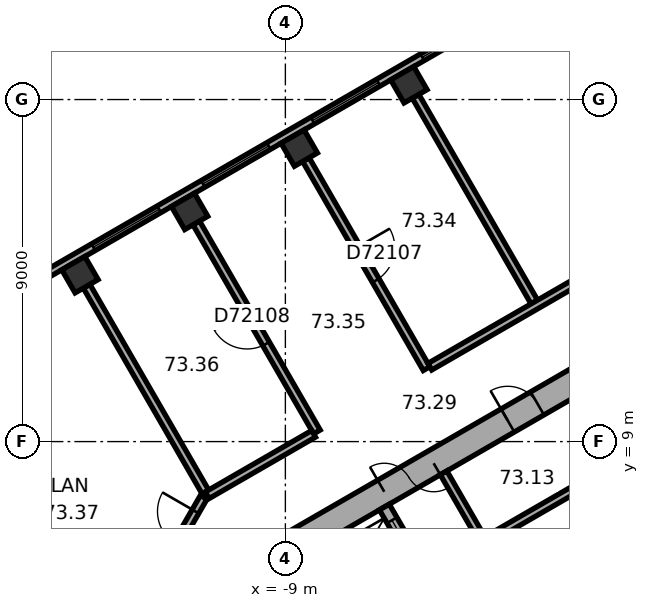
"""IFC4 building model, lengths in metres.
Left out: names, types, materials, properties, quantities, classifications, styles, units other than length and angle.
Written with IfcOpenShell. Run it as: python <this file> out.ifc"""

import sys

from ifc_helpers import new_model, si_unit, direction, frame, frame_2d, origin, origin_2d, place, context, subcontext, project, spatial, rectangle, extrude, element, fill, save


model = new_model("IFC4")
c1 = context("Model", 3, precision=1e-05, world=origin(), true_north=direction((0.0, 1.0)))
c2 = subcontext(c1, "Body", "Model", "MODEL_VIEW")
j1 = project(units=[si_unit("LENGTHUNIT", "METRE"), si_unit("PLANEANGLEUNIT", "RADIAN")], contexts=[c1])
p1 = place(None, origin())
s1 = spatial("IfcSite", under=j1, at=p1, CompositionType="ELEMENT")
p2 = place(p1, origin())
s2 = spatial("IfcBuilding", under=s1, at=p2, CompositionType="ELEMENT")
p3 = place(p2, frame((0.0, 0.0, 296.8)))
s3 = spatial("IfcBuildingStorey", under=s2, at=p3, CompositionType="ELEMENT", Elevation=296.8)
for number, where, z_axis, x_axis in (
    (1, (-5.75, 18.389, 0.0), (0.0, 0.0, 1.0), (-0.866, -0.5, 0.0)),
    (2, (-8.635, 16.723, 0.0), (0.0, 0.0, 1.0), (-0.866, -0.5, 0.0)),
    (3, (-11.52, 15.057, 0.0), (0.0, 0.0, 1.0), (-0.866, -0.5, 0.0)),
    (4, (-14.406, 13.391, 0.0), (0.0, 0.0, 1.0), (-0.866, -0.5, 0.0)),
):
    element("IfcColumn", number, at=place(p3, frame(where, z_axis=z_axis, x_axis=x_axis)), inside=s3, PredefinedType="COLUMN", context=c2, shape_type="SweptSolid", body=[
        extrude(rectangle(XDim=0.7, YDim=0.7, at=origin_2d()), origin(), (0.0, 0.0, 1.0), 3.7),
    ])
p4 = place(p3, frame((0.175, 11.475, 0.0), z_axis=(0.0, 0.0, 1.0), x_axis=(-0.866026453023, -0.499998182661, 0.0)))
e5 = element("IfcWall", 5, at=p4, inside=s3, PredefinedType="SHEAR", context=c2, shape_type="SweptSolid", body=[
    extrude(rectangle(XDim=11.778, YDim=0.7, at=frame_2d((5.889, 0.0))), origin(), (0.0, 0.0, 1.0), 3.7),
])
p5 = place(p4, frame((6.089, 0.0, 0.0)))
e6 = element("IfcOpeningElement", 6, at=p5, cuts=e5, PredefinedType="OPENING", context=c2, shape_type="SweptSolid", body=[
    extrude(rectangle(XDim=1.5, YDim=2.1, at=frame_2d((0.75, 1.05))), frame((0.0, 0.36, 0.0), z_axis=(0.0, -1.0, 0.0), x_axis=(1.0, 0.0, 0.0)), (0.0, 0.0, 1.0), 0.72),
])
p6 = place(p4, frame((2.939, 0.0, 0.0)))
e7 = element("IfcOpeningElement", 7, at=p6, cuts=e5, PredefinedType="OPENING", context=c2, shape_type="SweptSolid", body=[
    extrude(rectangle(XDim=0.9, YDim=2.1, at=frame_2d((0.45, 1.05))), frame((0.0, 0.36, 0.0), z_axis=(0.0, -1.0, 0.0), x_axis=(1.0, 0.0, 0.0)), (0.0, 0.0, 1.0), 0.72),
])
p7 = place(p3, frame((-2.624, 20.713, 0.0), z_axis=(0.0, 0.0, 1.0), x_axis=(-0.866026460444, -0.499998169808, 0.0)))
e8 = element("IfcWall", 8, at=p7, inside=s3, PredefinedType="STANDARD", context=c2, shape_type="SweptSolid", body=[
    extrude(rectangle(XDim=17.731, YDim=0.2, at=frame_2d((8.866, 0.0))), origin(), (0.0, 0.0, 1.0), 3.7),
])
p8 = place(p7, frame((1.203, 0.0, 0.9)))
e9 = element("IfcOpeningElement", 9, at=p8, cuts=e8, PredefinedType="OPENING", context=c2, shape_type="SweptSolid", body=[
    extrude(rectangle(XDim=2.0, YDim=2.0, at=frame_2d((1.0, 1.0))), frame((0.0, 0.11, 0.0), z_axis=(0.0, -1.0, 0.0), x_axis=(1.0, 0.0, 0.0)), (0.0, 0.0, 1.0), 0.22),
])
p9 = place(p7, frame((4.535, 0.0, 0.9)))
e10 = element("IfcOpeningElement", 10, at=p9, cuts=e8, PredefinedType="OPENING", context=c2, shape_type="SweptSolid", body=[
    extrude(rectangle(XDim=2.0, YDim=2.0, at=frame_2d((1.0, 1.0))), frame((0.0, 0.11, 0.0), z_axis=(0.0, -1.0, 0.0), x_axis=(1.0, 0.0, 0.0)), (0.0, 0.0, 1.0), 0.22),
])
p10 = place(p7, frame((7.867, 0.0, 0.9)))
e11 = element("IfcOpeningElement", 11, at=p10, cuts=e8, PredefinedType="OPENING", context=c2, shape_type="SweptSolid", body=[
    extrude(rectangle(XDim=2.0, YDim=2.0, at=frame_2d((1.0, 1.0))), frame((0.0, 0.11, 0.0), z_axis=(0.0, -1.0, 0.0), x_axis=(1.0, 0.0, 0.0)), (0.0, 0.0, 1.0), 0.22),
])
p11 = place(p7, frame((11.198, 0.0, 0.9)))
e12 = element("IfcOpeningElement", 12, at=p11, cuts=e8, PredefinedType="OPENING", context=c2, shape_type="SweptSolid", body=[
    extrude(rectangle(XDim=2.0, YDim=2.0, at=frame_2d((1.0, 1.0))), frame((0.0, 0.11, 0.0), z_axis=(0.0, -1.0, 0.0), x_axis=(1.0, 0.0, 0.0)), (0.0, 0.0, 1.0), 0.22),
])
p12 = place(p7, frame((14.53, 0.0, 0.9)))
e13 = element("IfcOpeningElement", 13, at=p12, cuts=e8, PredefinedType="OPENING", context=c2, shape_type="SweptSolid", body=[
    extrude(rectangle(XDim=2.0, YDim=2.0, at=frame_2d((1.0, 1.0))), frame((0.0, 0.11, 0.0), z_axis=(0.0, -1.0, 0.0), x_axis=(1.0, 0.0, 0.0)), (0.0, 0.0, 1.0), 0.22),
])
p13 = place(p3, frame((0.803, 9.009, 0.0), z_axis=(0.0, 0.0, 1.0), x_axis=(-0.866028230842, -0.499995103361, 0.0)))
e14 = element("IfcWall", 14, at=p13, inside=s3, PredefinedType="PARTITIONING", context=c2, shape_type="SweptSolid", body=[
    extrude(rectangle(XDim=5.4, YDim=0.2, at=frame_2d((2.7, 0.0))), origin(), (0.0, 0.0, 1.0), 3.35),
])
p14 = place(p3, frame((-3.737, 6.272, 0.0), z_axis=(0.0, 0.0, 1.0), x_axis=(-0.50002983664, 0.866008176907, 0.0)))
e15 = element("IfcWall", 15, at=p14, inside=s3, PredefinedType="PARTITIONING", context=c2, shape_type="SweptSolid", body=[
    extrude(rectangle(XDim=2.2, YDim=0.2, at=frame_2d((1.1, 0.0))), origin(), (0.0, 0.0, 1.0), 3.35),
])
p15 = place(p3, frame((-2.216, 4.282, 0.0), z_axis=(0.0, 0.0, 1.0), x_axis=(0.499977259774, 0.866038532462, 0.0)))
e16 = element("IfcWall", 16, at=p15, inside=s3, PredefinedType="SHEAR", context=c2, shape_type="SweptSolid", body=[
    extrude(rectangle(XDim=4.7, YDim=0.3, at=frame_2d((2.35, 0.0))), origin(), (0.0, 0.0, 1.0), 3.35),
])
p16 = place(p3, frame((-5.295, 5.372, 0.0), z_axis=(0.0, 0.0, 1.0), x_axis=(-0.500077893725, 0.86598042715, 0.0)))
e17 = element("IfcWall", 17, at=p16, inside=s3, PredefinedType="SHEAR", context=c2, shape_type="SweptSolid", body=[
    extrude(rectangle(XDim=2.2, YDim=0.3, at=frame_2d((1.1, 0.0))), origin(), (0.0, 0.0, 1.0), 3.35),
])
p17 = place(p16, frame((0.7, 0.0, 0.0)))
e18 = element("IfcOpeningElement", 18, at=p17, cuts=e17, PredefinedType="OPENING", context=c2, shape_type="SweptSolid", body=[
    extrude(rectangle(XDim=1.1, YDim=2.1, at=frame_2d((0.55, 1.05))), frame((0.0, 0.16, 0.0), z_axis=(0.0, -1.0, 0.0), x_axis=(1.0, 0.0, 0.0)), (0.0, 0.0, 1.0), 0.32),
])
p18 = place(p3, frame((-14.23, 13.088, 0.0), z_axis=(0.0, 0.0, 1.0), x_axis=(0.500004234368, -0.866022959057, 0.0)))
e19 = element("IfcWall", 19, at=p18, inside=s3, PredefinedType="PARTITIONING", context=c2, shape_type="SweptSolid", body=[
    extrude(rectangle(XDim=6.25, YDim=0.2, at=frame_2d((3.125, 0.0))), origin(), (0.0, 0.0, 1.0), 3.35),
])
p19 = place(p3, frame((-11.345, 14.754, 0.0), z_axis=(0.0, 0.0, 1.0), x_axis=(0.500005339912, -0.866022320763, 0.0)))
e20 = element("IfcWall", 20, at=p19, inside=s3, PredefinedType="PARTITIONING", context=c2, shape_type="SweptSolid", body=[
    extrude(rectangle(XDim=6.35, YDim=0.2, at=frame_2d((3.175, 0.0))), origin(), (0.0, 0.0, 1.0), 3.35),
])
p20 = place(p19, frame((2.675, 0.0, 0.0)))
e21 = element("IfcOpeningElement", 21, at=p20, cuts=e20, PredefinedType="OPENING", context=c2, shape_type="SweptSolid", body=[
    extrude(rectangle(XDim=1.0, YDim=2.1, at=frame_2d((0.5, 1.05))), frame((0.0, 0.11, 0.0), z_axis=(0.0, -1.0, 0.0), x_axis=(1.0, 0.0, 0.0)), (0.0, 0.0, 1.0), 0.22),
])
p21 = place(p3, frame((-11.15, 7.534, 0.0), z_axis=(0.0, 0.0, 1.0), x_axis=(-0.500063286585, -0.865988862174, 0.0)))
e22 = element("IfcWall", 22, at=p21, inside=s3, PredefinedType="PARTITIONING", context=c2, shape_type="SweptSolid", body=[
    extrude(rectangle(XDim=1.86, YDim=0.2, at=frame_2d((0.93, 0.0))), origin(), (0.0, 0.0, 1.0), 3.35),
])
p22 = place(p21, frame((0.43, 0.0, 0.0)))
e23 = element("IfcOpeningElement", 23, at=p22, cuts=e22, PredefinedType="OPENING", context=c2, shape_type="SweptSolid", body=[
    extrude(rectangle(XDim=1.0, YDim=2.1, at=frame_2d((0.5, 1.05))), frame((0.0, 0.11, 0.0), z_axis=(0.0, -1.0, 0.0), x_axis=(1.0, 0.0, 0.0)), (0.0, 0.0, 1.0), 0.22),
])
p23 = place(p3, frame((-8.46, 16.42, 0.0), z_axis=(0.0, 0.0, 1.0), x_axis=(0.500005339912, -0.866022320763, 0.0)))
e24 = element("IfcWall", 24, at=p23, inside=s3, PredefinedType="PARTITIONING", context=c2, shape_type="SweptSolid", body=[
    extrude(rectangle(XDim=6.35, YDim=0.2, at=frame_2d((3.175, 0.0))), origin(), (0.0, 0.0, 1.0), 2.65),
])
p24 = place(p23, frame((2.675, 0.0, 0.0)))
e25 = element("IfcOpeningElement", 25, at=p24, cuts=e24, PredefinedType="OPENING", context=c2, shape_type="SweptSolid", body=[
    extrude(rectangle(XDim=1.0, YDim=2.1, at=frame_2d((0.5, 1.05))), frame((0.0, 0.11, 0.0), z_axis=(0.0, -1.0, 0.0), x_axis=(1.0, 0.0, 0.0)), (0.0, 0.0, 1.0), 0.22),
])
p25 = place(p3, frame((-8.257, 9.205, 0.0), z_axis=(0.0, 0.0, 1.0), x_axis=(-0.866030838723, -0.499990586292, 0.0)))
e26 = element("IfcWall", 26, at=p25, inside=s3, PredefinedType="PARTITIONING", context=c2, shape_type="SweptSolid", body=[
    extrude(rectangle(XDim=3.231, YDim=0.2, at=frame_2d((1.616, 0.0))), origin(), (0.0, 0.0, 1.0), 3.35),
])
p26 = place(p3, frame((-5.575, 18.086, 0.0), z_axis=(0.0, 0.0, 1.0), x_axis=(0.500004234368, -0.866022959057, 0.0)))
e27 = element("IfcWall", 27, at=p26, inside=s3, PredefinedType="PARTITIONING", context=c2, shape_type="SweptSolid", body=[
    extrude(rectangle(XDim=6.25, YDim=0.2, at=frame_2d((3.125, 0.0))), origin(), (0.0, 0.0, 1.0), 3.35),
])
p27 = place(p3, frame((-0.95, 13.423, 0.0), z_axis=(0.0, 0.0, 1.0), x_axis=(-0.86603557629, -0.499982380289, 0.0)))
e28 = element("IfcWall", 28, at=p27, inside=s3, PredefinedType="PARTITIONING", context=c2, shape_type="SweptSolid", body=[
    extrude(rectangle(XDim=4.906, YDim=0.2, at=frame_2d((2.453, 0.0))), origin(), (0.0, 0.0, 1.0), 3.35),
])
p28 = place(p8, origin())
e29 = element("IfcWindow", 29, at=p28, inside=s3, PartitioningType="SINGLE_PANEL", PredefinedType="WINDOW", context=c2, shape_type="SweptSolid", body=[
    extrude(rectangle(XDim=2.0, YDim=2.0, at=frame_2d((1.0, 1.0))), frame((0.0, 0.03, 0.0), z_axis=(0.0, -1.0, 0.0), x_axis=(1.0, 0.0, 0.0)), (0.0, 0.0, 1.0), 0.06),
])
fill(e9, e29)
p29 = place(p9, origin())
e30 = element("IfcWindow", 30, at=p29, inside=s3, PartitioningType="SINGLE_PANEL", PredefinedType="WINDOW", context=c2, shape_type="SweptSolid", body=[
    extrude(rectangle(XDim=2.0, YDim=2.0, at=frame_2d((1.0, 1.0))), frame((0.0, 0.03, 0.0), z_axis=(0.0, -1.0, 0.0), x_axis=(1.0, 0.0, 0.0)), (0.0, 0.0, 1.0), 0.06),
])
fill(e10, e30)
p30 = place(p10, origin())
e31 = element("IfcWindow", 31, at=p30, inside=s3, PartitioningType="SINGLE_PANEL", PredefinedType="WINDOW", context=c2, shape_type="SweptSolid", body=[
    extrude(rectangle(XDim=2.0, YDim=2.0, at=frame_2d((1.0, 1.0))), frame((0.0, 0.03, 0.0), z_axis=(0.0, -1.0, 0.0), x_axis=(1.0, 0.0, 0.0)), (0.0, 0.0, 1.0), 0.06),
])
fill(e11, e31)
p31 = place(p11, origin())
e32 = element("IfcWindow", 32, at=p31, inside=s3, PartitioningType="SINGLE_PANEL", PredefinedType="WINDOW", context=c2, shape_type="SweptSolid", body=[
    extrude(rectangle(XDim=2.0, YDim=2.0, at=frame_2d((1.0, 1.0))), frame((0.0, 0.03, 0.0), z_axis=(0.0, -1.0, 0.0), x_axis=(1.0, 0.0, 0.0)), (0.0, 0.0, 1.0), 0.06),
])
fill(e12, e32)
p32 = place(p5, origin())
e33 = element("IfcDoor", 33, at=p32, inside=s3, OperationType="DOUBLE_DOOR_SINGLE_SWING", PredefinedType="DOOR", context=c2, shape_type="SweptSolid", body=[
    extrude(rectangle(XDim=1.5, YDim=2.1, at=frame_2d((0.75, 1.05))), frame((0.0, 0.025, 0.0), z_axis=(0.0, -1.0, 0.0), x_axis=(1.0, 0.0, 0.0)), (0.0, 0.0, 1.0), 0.05),
])
fill(e6, e33)
p33 = place(p6, origin())
e34 = element("IfcDoor", 34, at=p33, inside=s3, OperationType="SINGLE_SWING_LEFT", PredefinedType="DOOR", context=c2, shape_type="SweptSolid", body=[
    extrude(rectangle(XDim=0.9, YDim=2.1, at=frame_2d((0.45, 1.05))), frame((0.0, 0.025, 0.0), z_axis=(0.0, -1.0, 0.0), x_axis=(1.0, 0.0, 0.0)), (0.0, 0.0, 1.0), 0.05),
])
fill(e7, e34)
p34 = place(p17, origin())
e35 = element("IfcDoor", 35, at=p34, inside=s3, OperationType="DOUBLE_DOOR_SLIDING", PredefinedType="DOOR", context=c2, shape_type="SweptSolid", body=[
    extrude(rectangle(XDim=1.1, YDim=2.1, at=frame_2d((0.55, 1.05))), frame((0.0, 0.025, 0.0), z_axis=(0.0, -1.0, 0.0), x_axis=(1.0, 0.0, 0.0)), (0.0, 0.0, 1.0), 0.05),
])
fill(e18, e35)
p35 = place(p24, origin())
e36 = element("IfcDoor", 36, at=p35, inside=s3, OperationType="SINGLE_SWING_LEFT", PredefinedType="DOOR", context=c2, shape_type="SweptSolid", body=[
    extrude(rectangle(XDim=1.0, YDim=2.1, at=frame_2d((0.5, 1.05))), frame((0.0, 0.025, 0.0), z_axis=(0.0, -1.0, 0.0), x_axis=(1.0, 0.0, 0.0)), (0.0, 0.0, 1.0), 0.05),
])
fill(e25, e36)
p36 = place(p20, origin())
e37 = element("IfcDoor", 37, at=p36, inside=s3, OperationType="SINGLE_SWING_LEFT", PredefinedType="DOOR", context=c2, shape_type="SweptSolid", body=[
    extrude(rectangle(XDim=1.0, YDim=2.1, at=frame_2d((0.5, 1.05))), frame((0.0, 0.025, 0.0), z_axis=(0.0, -1.0, 0.0), x_axis=(1.0, 0.0, 0.0)), (0.0, 0.0, 1.0), 0.05),
])
fill(e21, e37)
p37 = place(p22, origin())
e38 = element("IfcDoor", 38, at=p37, inside=s3, OperationType="SINGLE_SWING_LEFT", PredefinedType="DOOR", context=c2, shape_type="SweptSolid", body=[
    extrude(rectangle(XDim=1.0, YDim=2.1, at=frame_2d((0.5, 1.05))), frame((0.0, 0.025, 0.0), z_axis=(0.0, -1.0, 0.0), x_axis=(1.0, 0.0, 0.0)), (0.0, 0.0, 1.0), 0.05),
])
fill(e23, e38)
save(model, sys.argv[1])
